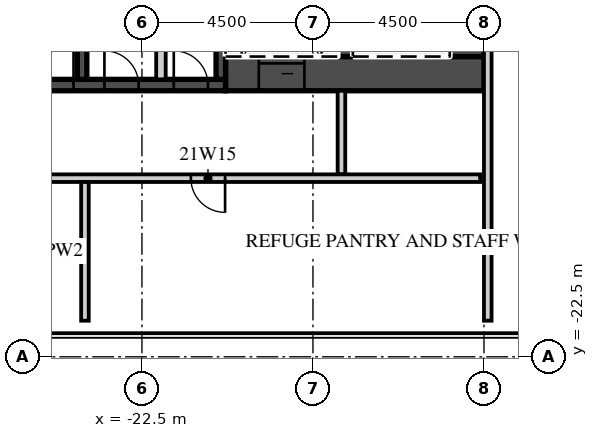
"""IFC4 building model, lengths in metres.
Left out: names, types, materials, properties, quantities, classifications, styles, units other than length and angle.
Written with IfcOpenShell. Run it as: python <this file> out.ifc"""

import sys

from ifc_helpers import new_model, si_unit, direction, frame, frame_2d, origin, place, context, subcontext, project, spatial, rectangle, extrude, element, fill, save


model = new_model("IFC4")
c1 = context("Model", 3, precision=1e-05, world=origin(), true_north=direction((0.0, 1.0)))
c2 = subcontext(c1, "Body", "Model", "MODEL_VIEW")
j1 = project(units=[si_unit("LENGTHUNIT", "METRE"), si_unit("PLANEANGLEUNIT", "RADIAN")], contexts=[c1])
p1 = place(None, origin())
s1 = spatial("IfcSite", under=j1, at=p1, CompositionType="ELEMENT")
p2 = place(p1, origin())
s2 = spatial("IfcBuilding", under=s1, at=p2, CompositionType="ELEMENT")
p3 = place(p2, frame((0.0, 0.0, 99.6)))
s3 = spatial("IfcBuildingStorey", under=s2, at=p3, CompositionType="ELEMENT", Elevation=99.6)
p4 = place(p3, frame((-20.3, -15.05, 0.0), z_axis=(0.0, 0.0, 1.0), x_axis=(1.0, 0.0, 0.0)))
e1 = element("IfcWall", 1, at=p4, inside=s3, PredefinedType="SHEAR", context=c2, shape_type="SweptSolid", body=[
    extrude(rectangle(XDim=6.8, YDim=0.9, at=frame_2d((3.4, 0.0))), origin(), (0.0, 0.0, 1.0), 4.2),
])
p5 = place(p4, frame((0.875, 0.0, 0.0)))
e2 = element("IfcOpeningElement", 2, at=p5, cuts=e1, PredefinedType="OPENING", context=c2, shape_type="SweptSolid", body=[
    extrude(rectangle(XDim=1.2, YDim=2.1, at=frame_2d((0.6, 1.05))), frame((0.0, 0.46, 0.0), z_axis=(0.0, -1.0, 0.0), x_axis=(1.0, 0.0, 0.0)), (0.0, 0.0, 1.0), 0.92),
])
p6 = place(p3, frame((-30.6, -15.35, 0.0), z_axis=(0.0, 0.0, 1.0), x_axis=(1.0, 0.0, 0.0)))
e3 = element("IfcWall", 3, at=p6, inside=s3, PredefinedType="SHEAR", context=c2, shape_type="SweptSolid", body=[
    extrude(rectangle(XDim=10.3, YDim=0.3, at=frame_2d((5.15, 0.0))), origin(), (0.0, 0.0, 1.0), 4.2),
])
p7 = place(p6, frame((5.0, 0.0, 0.0)))
e4 = element("IfcOpeningElement", 4, at=p7, cuts=e3, PredefinedType="OPENING", context=c2, shape_type="SweptSolid", body=[
    extrude(rectangle(XDim=1.3, YDim=2.1, at=frame_2d((0.65, 1.05))), frame((0.0, 0.16, 0.0), z_axis=(0.0, -1.0, 0.0), x_axis=(1.0, 0.0, 0.0)), (0.0, 0.0, 1.0), 0.32),
])
p8 = place(p6, frame((7.113, 0.0, 0.0)))
e5 = element("IfcOpeningElement", 5, at=p8, cuts=e3, PredefinedType="OPENING", context=c2, shape_type="SweptSolid", body=[
    extrude(rectangle(XDim=0.9, YDim=2.1, at=frame_2d((0.45, 1.05))), frame((0.0, 0.16, 0.0), z_axis=(0.0, -1.0, 0.0), x_axis=(1.0, 0.0, 0.0)), (0.0, 0.0, 1.0), 0.32),
])
p9 = place(p6, frame((8.938, 0.0, 0.0)))
e6 = element("IfcOpeningElement", 6, at=p9, cuts=e3, PredefinedType="OPENING", context=c2, shape_type="SweptSolid", body=[
    extrude(rectangle(XDim=0.9, YDim=2.1, at=frame_2d((0.45, 1.05))), frame((0.0, 0.16, 0.0), z_axis=(0.0, -1.0, 0.0), x_axis=(1.0, 0.0, 0.0)), (0.0, 0.0, 1.0), 0.32),
])
p10 = place(p3, frame((-13.95, -14.6, 0.0), z_axis=(0.0, 0.0, 1.0), x_axis=(0.0, 1.0, 0.0)))
e7 = element("IfcWall", 7, at=p10, inside=s3, PredefinedType="SHEAR", context=c2, shape_type="SweptSolid", body=[
    extrude(rectangle(XDim=12.2, YDim=0.9, at=frame_2d((6.1, 0.0))), origin(), (0.0, 0.0, 1.0), 4.2),
])
p11 = place(p3, frame((-17.15, -14.6, 0.0), z_axis=(0.0, 0.0, 1.0), x_axis=(0.0, 1.0, 0.0)))
e8 = element("IfcWall", 8, at=p11, inside=s3, PredefinedType="SHEAR", context=c2, shape_type="SweptSolid", body=[
    extrude(rectangle(XDim=5.8, YDim=0.4, at=frame_2d((2.9, 0.0))), origin(), (0.0, 0.0, 1.0), 4.2),
])
for number, where, z_axis, x_axis in (
    (9, (-20.425, -15.2, 0.0), (0.0, 0.0, 1.0), (0.0, 1.0, 0.0)),
    (10, (-24.075, -15.2, 0.0), (0.0, 0.0, 1.0), (0.0, 1.0, 0.0)),
):
    element("IfcWall", number, at=place(p3, frame(where, z_axis=z_axis, x_axis=x_axis)), inside=s3, PredefinedType="SHEAR", context=c2, shape_type="SweptSolid", body=[
        extrude(rectangle(XDim=3.25, YDim=0.25, at=frame_2d((1.625, 0.0))), origin(), (0.0, 0.0, 1.0), 4.2),
    ])
p12 = place(p3, frame((-22.0, -15.2, 0.0), z_axis=(0.0, 0.0, 1.0), x_axis=(0.0, 1.0, 0.0)))
e11 = element("IfcWall", 11, at=p12, inside=s3, PredefinedType="PARTITIONING", context=c2, shape_type="SweptSolid", body=[
    extrude(rectangle(XDim=3.25, YDim=0.25, at=frame_2d((1.625, 0.0))), origin(), (0.0, 0.0, 1.0), 4.2),
])
p13 = place(p3, frame((-17.25, -17.7, 0.0), z_axis=(0.0, 0.0, 1.0), x_axis=(0.0, 1.0, 0.0)))
e12 = element("IfcWall", 12, at=p13, inside=s3, PredefinedType="PARTITIONING", context=c2, shape_type="SweptSolid", body=[
    extrude(rectangle(XDim=2.2, YDim=0.2, at=frame_2d((1.1, 0.0))), origin(), (0.0, 0.0, 1.0), 4.2),
])
p14 = place(p3, frame((-44.55, -17.8, 0.0), z_axis=(0.0, 0.0, 1.0), x_axis=(1.0, 0.0, 0.0)))
e13 = element("IfcWall", 13, at=p14, inside=s3, PredefinedType="PARTITIONING", context=c2, shape_type="SweptSolid", body=[
    extrude(rectangle(XDim=30.95, YDim=0.2, at=frame_2d((15.475, 0.0))), origin(), (0.0, 0.0, 1.0), 4.2),
])
p15 = place(p14, frame((15.038, 0.0, 0.0)))
e14 = element("IfcOpeningElement", 14, at=p15, cuts=e13, PredefinedType="OPENING", context=c2, shape_type="SweptSolid", body=[
    extrude(rectangle(XDim=0.9, YDim=2.1, at=frame_2d((0.45, 1.05))), frame((0.0, 0.11, 0.0), z_axis=(0.0, -1.0, 0.0), x_axis=(1.0, 0.0, 0.0)), (0.0, 0.0, 1.0), 0.22),
])
p16 = place(p14, frame((23.337, 0.0, 0.0)))
e15 = element("IfcOpeningElement", 15, at=p16, cuts=e13, PredefinedType="OPENING", context=c2, shape_type="SweptSolid", body=[
    extrude(rectangle(XDim=0.9, YDim=2.1, at=frame_2d((0.45, 1.05))), frame((0.0, 0.11, 0.0), z_axis=(0.0, -1.0, 0.0), x_axis=(1.0, 0.0, 0.0)), (0.0, 0.0, 1.0), 0.22),
])
p17 = place(p3, frame((-24.0, -21.55, 0.0), z_axis=(0.0, 0.0, 1.0), x_axis=(0.0, 1.0, 0.0)))
e16 = element("IfcWall", 16, at=p17, inside=s3, PredefinedType="PARTITIONING", context=c2, shape_type="SweptSolid", body=[
    extrude(rectangle(XDim=3.65, YDim=0.2, at=frame_2d((1.825, 0.0))), origin(), (0.0, 0.0, 1.0), 4.2),
])
p18 = place(p3, frame((-13.4, -21.55, 0.0), z_axis=(0.0, 0.0, 1.0), x_axis=(0.0, 1.0, 0.0)))
e17 = element("IfcWall", 17, at=p18, inside=s3, PredefinedType="PARTITIONING", context=c2, shape_type="SweptSolid", body=[
    extrude(rectangle(XDim=19.95, YDim=0.2, at=frame_2d((9.975, 0.0))), origin(), (0.0, 0.0, 1.0), 4.2),
])
p19 = place(p5, origin())
e18 = element("IfcDoor", 18, at=p19, inside=s3, OperationType="SLIDING_TO_LEFT", PredefinedType="DOOR", context=c2, shape_type="SweptSolid", body=[
    extrude(rectangle(XDim=1.2, YDim=2.1, at=frame_2d((0.6, 1.05))), frame((0.0, 0.025, 0.0), z_axis=(0.0, -1.0, 0.0), x_axis=(1.0, 0.0, 0.0)), (0.0, 0.0, 1.0), 0.05),
])
fill(e2, e18)
p20 = place(p7, origin())
e19 = element("IfcDoor", 19, at=p20, inside=s3, OperationType="SINGLE_SWING_RIGHT", PredefinedType="DOOR", context=c2, shape_type="SweptSolid", body=[
    extrude(rectangle(XDim=1.3, YDim=2.1, at=frame_2d((0.65, 1.05))), frame((0.0, 0.025, 0.0), z_axis=(0.0, -1.0, 0.0), x_axis=(1.0, 0.0, 0.0)), (0.0, 0.0, 1.0), 0.05),
])
fill(e4, e19)
p21 = place(p8, origin())
e20 = element("IfcDoor", 20, at=p21, inside=s3, OperationType="SINGLE_SWING_LEFT", PredefinedType="DOOR", context=c2, shape_type="SweptSolid", body=[
    extrude(rectangle(XDim=0.9, YDim=2.1, at=frame_2d((0.45, 1.05))), frame((0.0, 0.025, 0.0), z_axis=(0.0, -1.0, 0.0), x_axis=(1.0, 0.0, 0.0)), (0.0, 0.0, 1.0), 0.05),
])
fill(e5, e20)
p22 = place(p9, origin())
e21 = element("IfcDoor", 21, at=p22, inside=s3, OperationType="SINGLE_SWING_LEFT", PredefinedType="DOOR", context=c2, shape_type="SweptSolid", body=[
    extrude(rectangle(XDim=0.9, YDim=2.1, at=frame_2d((0.45, 1.05))), frame((0.0, 0.025, 0.0), z_axis=(0.0, -1.0, 0.0), x_axis=(1.0, 0.0, 0.0)), (0.0, 0.0, 1.0), 0.05),
])
fill(e6, e21)
p23 = place(p16, origin())
e22 = element("IfcDoor", 22, at=p23, inside=s3, OperationType="SINGLE_SWING_RIGHT", PredefinedType="DOOR", context=c2, shape_type="SweptSolid", body=[
    extrude(rectangle(XDim=0.9, YDim=2.1, at=frame_2d((0.45, 1.05))), frame((0.0, 0.025, 0.0), z_axis=(0.0, -1.0, 0.0), x_axis=(1.0, 0.0, 0.0)), (0.0, 0.0, 1.0), 0.05),
])
fill(e15, e22)
save(model, sys.argv[1])
